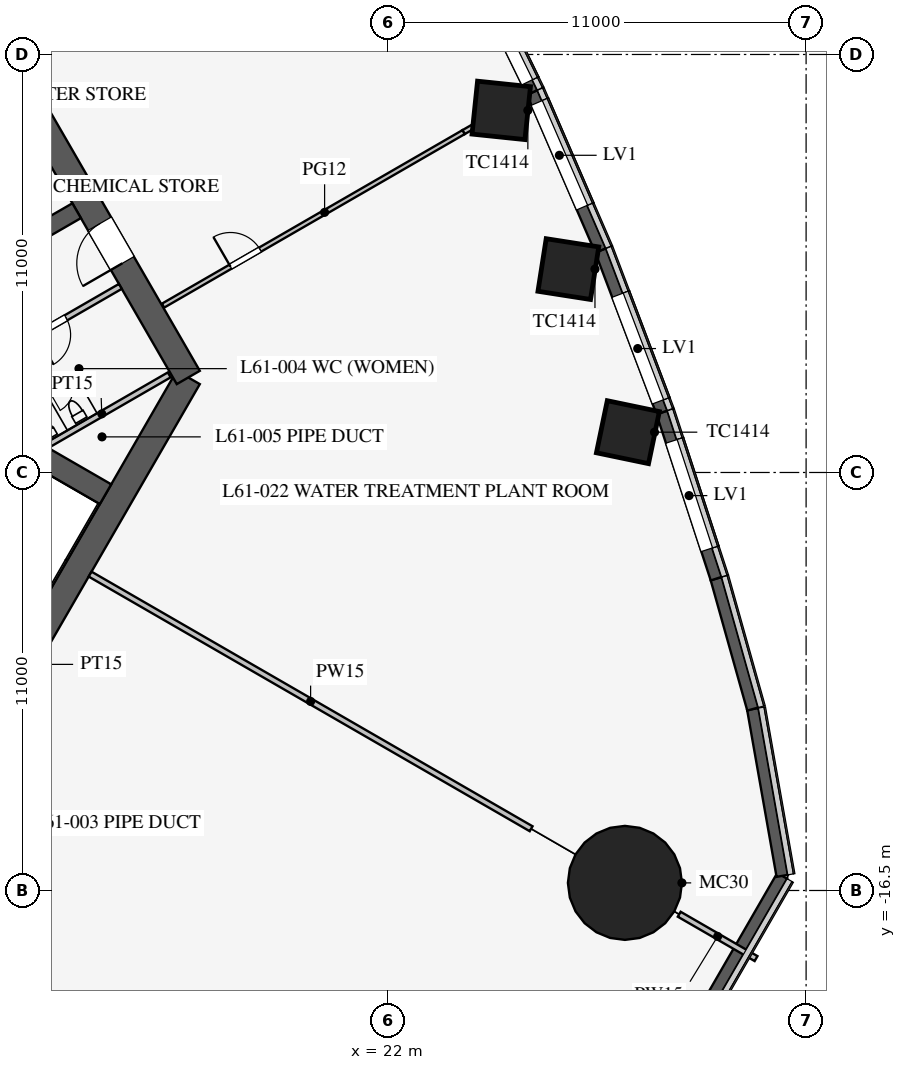
"""IFC4 building model, lengths in metres.
Left out: names, types, materials, properties, quantities, classifications, styles, units other than length and angle.
Written with IfcOpenShell. Run it as: python <this file> out.ifc"""

import sys

from ifc_helpers import new_model, si_unit, direction, frame, frame_2d, origin, origin_2d, place, context, subcontext, project, spatial, polyline, rectangle, circle, outline, extrude, clip, halfspace, element, fill, save


model = new_model("IFC4")
c1 = context("Model", 3, precision=1e-05, world=origin(), true_north=direction((0.0, 1.0)))
c2 = subcontext(c1, "Body", "Model", "MODEL_VIEW")
j1 = project(units=[si_unit("LENGTHUNIT", "METRE"), si_unit("PLANEANGLEUNIT", "RADIAN")], contexts=[c1])
p1 = place(None, origin())
s1 = spatial("IfcSite", under=j1, at=p1, CompositionType="ELEMENT")
p2 = place(p1, origin())
s2 = spatial("IfcBuilding", under=s1, at=p2, CompositionType="ELEMENT")
p3 = place(p2, frame((0.0, 0.0, 265.3)))
s3 = spatial("IfcBuildingStorey", under=s2, at=p3, CompositionType="ELEMENT", Elevation=265.3)
p4 = place(p3, frame((28.632, -4.254, 0.0), z_axis=(-0.255546793754, -0.147542991373, 0.955472083265), x_axis=(-0.320581329676, 0.945304069978, 0.060231439844)))
e1 = element("IfcColumn", 1, at=p4, inside=s3, PredefinedType="COLUMN", context=c2, shape_type="Clipping", body=[
    clip(clip(extrude(rectangle(XDim=1.4, YDim=1.4, at=origin_2d()), origin(), (0.0, 0.0, 1.0), 6.28), halfspace(frame((0.0, 0.0, 0.257), z_axis=(7.594889496753688e-06, -2.3779827352743425e-05, 0.9999999996884188), x_axis=(0.0, 0.99999999971726, 2.3779827353429264e-05)), True)), halfspace(frame((0.0, 0.0, 6.023), z_axis=(-7.594889496753688e-06, 2.3779827352743425e-05, -0.9999999996884188), x_axis=(0.0, -0.99999999971726, -2.3779827353429264e-05)), True)),
])
p5 = place(p3, frame((27.022, 0.013, 0.0), z_axis=(-0.223891049085, -0.129279785892, 0.96600182976), x_axis=(-0.364788927644, 0.930232982642, 0.03994541618)))
e2 = element("IfcColumn", 2, at=p5, inside=s3, PredefinedType="COLUMN", context=c2, shape_type="Clipping", body=[
    clip(clip(extrude(rectangle(XDim=1.4, YDim=1.4, at=origin_2d()), origin(), (0.0, 0.0, 1.0), 6.211), halfspace(frame((0.0, 0.0, 0.215), z_axis=(1.7703553432418806e-05, -2.2252505130410105e-05, 0.9999999995957052), x_axis=(0.0, 0.999999999752413, 2.2252505133897248e-05)), True)), halfspace(frame((0.0, 0.0, 5.996), z_axis=(-1.7703553432418806e-05, 2.2252505130410105e-05, -0.9999999995957052), x_axis=(0.0, -0.999999999752413, -2.2252505133897248e-05)), True)),
])
p6 = place(p3, frame((25.227, 4.172, 0.0), z_axis=(-0.201282046639, -0.116233851942, 0.972612579275), x_axis=(-0.410094064626, 0.911725070406, 0.024088465132)))
e3 = element("IfcColumn", 3, at=p6, inside=s3, PredefinedType="COLUMN", context=c2, shape_type="Clipping", body=[
    clip(clip(extrude(rectangle(XDim=1.4, YDim=1.4, at=origin_2d()), origin(), (0.0, 0.0, 1.0), 6.169), halfspace(frame((0.0, 0.0, 0.185), z_axis=(2.1284951141970626e-05, -6.9994991401256534e-06, 0.999999999748979), x_axis=(0.0, 0.9999999999755035, 6.999499141711211e-06)), True)), halfspace(frame((0.0, 0.0, 5.984), z_axis=(-2.1284951141970626e-05, 6.9994991401256534e-06, -0.999999999748979), x_axis=(0.0, -0.9999999999755035, -6.999499141711211e-06)), True)),
])
p7 = place(p3, frame((28.579, -16.5, 0.0), z_axis=(-0.273879842323, 0.158113013975, 0.948678083852), x_axis=(-0.499972520799, -0.866041268327, 0.0)))
e4 = element("IfcColumn", 4, at=p7, inside=s3, PredefinedType="COLUMN", context=c2, shape_type="Clipping", body=[
    clip(clip(extrude(circle(Radius=1.5, at=origin_2d()), origin(), (0.0, 0.0, 1.0), 6.325), halfspace(frame((0.0, 0.0, 0.501), z_axis=(-1.0033762616878938e-05, 1.6488271940395816e-05, 0.9999999998137303), x_axis=(0.0, 0.9999999998640685, -1.6488271941225806e-05)), True)), halfspace(frame((0.0, 0.0, 5.823), z_axis=(1.0033762616878938e-05, -1.6488271940395816e-05, -0.9999999998137303), x_axis=(0.0, -0.9999999998640685, 1.6488271941225806e-05)), True)),
])
p8 = place(p3, frame((10.97, -13.0, 0.0), z_axis=(0.0, 0.0, 1.0), x_axis=(0.499995765644, 0.866027848477, 0.0)))
e5 = element("IfcWall", 5, at=p8, inside=s3, PredefinedType="SHEAR", context=c2, shape_type="SweptSolid", body=[
    extrude(rectangle(XDim=11.547, YDim=0.7, at=frame_2d((5.773, 0.0))), origin(), (0.0, 0.0, 1.0), 6.0),
])
p9 = place(p3, frame((16.743, -3.0, 0.0), z_axis=(0.0, 0.0, 1.0), x_axis=(-0.500002442456, 0.866023993627, 0.0)))
e6 = element("IfcWall", 6, at=p9, inside=s3, PredefinedType="SHEAR", context=c2, shape_type="SweptSolid", body=[
    extrude(rectangle(XDim=21.939, YDim=0.7, at=frame_2d((10.97, 0.0))), origin(), (0.0, 0.0, 1.0), 6.0),
])
p10 = place(p9, frame((17.27, 0.0, 0.0)))
e7 = element("IfcOpeningElement", 7, at=p10, cuts=e6, PredefinedType="OPENING", context=c2, shape_type="SweptSolid", body=[
    extrude(rectangle(XDim=1.2, YDim=2.1, at=frame_2d((0.6, 1.05))), frame((0.0, 0.36, 0.0), z_axis=(0.0, -1.0, 0.0), x_axis=(1.0, 0.0, 0.0)), (0.0, 0.0, 1.0), 0.72),
])
p11 = place(p9, frame((3.47, 0.0, 0.0)))
e8 = element("IfcOpeningElement", 8, at=p11, cuts=e6, PredefinedType="OPENING", context=c2, shape_type="SweptSolid", body=[
    extrude(rectangle(XDim=1.2, YDim=2.1, at=frame_2d((0.6, 1.05))), frame((0.0, 0.36, 0.0), z_axis=(0.0, -1.0, 0.0), x_axis=(1.0, 0.0, 0.0)), (0.0, 0.0, 1.0), 0.72),
])
p12 = place(p3, frame((11.532, 0.076, 0.0), z_axis=(0.0, 0.0, 1.0), x_axis=(0.866013657776, 0.500020344131, 0.0)))
e9 = element("IfcWall", 9, at=p12, inside=s3, PredefinedType="SHEAR", context=c2, shape_type="SweptSolid", body=[
    extrude(rectangle(XDim=2.625, YDim=0.45, at=frame_2d((1.312, 0.0))), origin(), (0.0, 0.0, 1.0), 6.0),
])
p13 = place(p3, frame((6.663, -1.509, 0.0), z_axis=(0.0, 0.0, 1.0), x_axis=(0.866028310072, -0.499994966129, 0.0)))
e10 = element("IfcWall", 10, at=p13, inside=s3, PredefinedType="SHEAR", context=c2, shape_type="SweptSolid", body=[
    extrude(rectangle(XDim=9.125, YDim=0.6, at=frame_2d((4.562, 0.0))), origin(), (0.0, 0.0, 1.0), 6.0),
])
p14 = place(p3, frame((30.142, -19.976, 0.0), z_axis=(0.0, 0.0, 1.0), x_axis=(0.499973719246, 0.866040576453, 0.0)))
e11 = element("IfcWall", 11, at=p14, inside=s3, PredefinedType="SOLIDWALL", context=c2, shape_type="SweptSolid", body=[
    extrude(rectangle(XDim=4.458, YDim=0.3, at=frame_2d((2.229, 0.0))), origin(), (0.0, 0.0, 1.0), 5.8),
])
p15 = place(p3, frame((32.371, -16.115, 0.0), z_axis=(0.0, 0.0, 1.0), x_axis=(-0.173619736019, 0.984812767619, 0.0)))
e12 = element("IfcWall", 12, at=p15, inside=s3, PredefinedType="SOLIDWALL", context=c2, shape_type="SweptSolid", body=[
    extrude(rectangle(XDim=4.458, YDim=0.3, at=frame_2d((2.229, 0.0))), origin(), (0.0, 0.0, 1.0), 5.8),
])
p16 = place(p3, frame((31.597, -11.726, 0.0), z_axis=(0.0, 0.0, 1.0), x_axis=(-0.270338835198, 0.962765243548, 0.0)))
e13 = element("IfcWall", 13, at=p16, inside=s3, PredefinedType="SOLIDWALL", context=c2, shape_type="SweptSolid", body=[
    extrude(rectangle(XDim=3.563, YDim=0.3, at=frame_2d((1.782, 0.0))), origin(), (0.0, 0.0, 1.0), 5.8),
])
p17 = place(p3, frame((30.633, -8.295, 0.0), z_axis=(0.0, 0.0, 1.0), x_axis=(-0.310154105003, 0.950686294815, 0.0)))
e14 = element("IfcWall", 14, at=p17, inside=s3, PredefinedType="SOLIDWALL", context=c2, shape_type="SweptSolid", body=[
    extrude(rectangle(XDim=4.599, YDim=0.3, at=frame_2d((2.3, 0.0))), origin(), (0.0, 0.0, 1.0), 5.8),
])
p18 = place(p17, frame((0.8, 0.0, 3.5)))
e15 = element("IfcOpeningElement", 15, at=p18, cuts=e14, PredefinedType="OPENING", context=c2, shape_type="SweptSolid", body=[
    extrude(rectangle(XDim=3.0, YDim=2.0, at=frame_2d((1.5, 1.0))), frame((0.0, 0.16, 0.0), z_axis=(0.0, -1.0, 0.0), x_axis=(1.0, 0.0, 0.0)), (0.0, 0.0, 1.0), 0.32),
])
p19 = place(p3, frame((29.207, -3.922, 0.0), z_axis=(0.0, 0.0, 1.0), x_axis=(-0.354202230189, 0.935168851133, 0.0)))
e16 = element("IfcWall", 16, at=p19, inside=s3, PredefinedType="SOLIDWALL", context=c2, shape_type="SweptSolid", body=[
    extrude(rectangle(XDim=4.56, YDim=0.3, at=frame_2d((2.28, 0.0))), origin(), (0.0, 0.0, 1.0), 5.8),
])
p20 = place(p19, frame((0.3, 0.0, 3.5)))
e17 = element("IfcOpeningElement", 17, at=p20, cuts=e16, PredefinedType="OPENING", context=c2, shape_type="SweptSolid", body=[
    extrude(rectangle(XDim=3.0, YDim=2.0, at=frame_2d((1.5, 1.0))), frame((0.0, 0.16, 0.0), z_axis=(0.0, -1.0, 0.0), x_axis=(1.0, 0.0, 0.0)), (0.0, 0.0, 1.0), 0.32),
])
p21 = place(p3, frame((27.592, 0.342, 0.0), z_axis=(0.0, 0.0, 1.0), x_axis=(-0.397208101111, 0.917728567939, 0.0)))
e18 = element("IfcWall", 18, at=p21, inside=s3, PredefinedType="SOLIDWALL", context=c2, shape_type="SweptSolid", body=[
    extrude(rectangle(XDim=4.53, YDim=0.3, at=frame_2d((2.265, 0.0))), origin(), (0.0, 0.0, 1.0), 5.8),
])
p22 = place(p21, frame((1.23, 0.0, 3.5)))
e19 = element("IfcOpeningElement", 19, at=p22, cuts=e18, PredefinedType="OPENING", context=c2, shape_type="SweptSolid", body=[
    extrude(rectangle(XDim=3.0, YDim=2.0, at=frame_2d((1.5, 1.0))), frame((0.0, 0.16, 0.0), z_axis=(0.0, -1.0, 0.0), x_axis=(1.0, 0.0, 0.0)), (0.0, 0.0, 1.0), 0.32),
])
p23 = place(p3, frame((25.792, 4.499, 0.0), z_axis=(0.0, 0.0, 1.0), x_axis=(-0.439163535873, 0.898407139753, 0.0)))
e20 = element("IfcWall", 20, at=p23, inside=s3, PredefinedType="SOLIDWALL", context=c2, shape_type="SweptSolid", body=[
    extrude(rectangle(XDim=4.511, YDim=0.3, at=frame_2d((2.255, 0.0))), origin(), (0.0, 0.0, 1.0), 5.8),
])
p24 = place(p23, frame((0.3, 0.0, 3.5)))
e21 = element("IfcOpeningElement", 21, at=p24, cuts=e20, PredefinedType="OPENING", context=c2, shape_type="SweptSolid", body=[
    extrude(rectangle(XDim=3.0, YDim=2.0, at=frame_2d((1.5, 1.0))), frame((0.0, 0.16, 0.0), z_axis=(0.0, -1.0, 0.0), x_axis=(1.0, 0.0, 0.0)), (0.0, 0.0, 1.0), 0.32),
])
p25 = place(p3, frame((10.495, -3.178, 0.0), z_axis=(0.0, 0.0, 1.0), x_axis=(0.866037967349, 0.499978238636, 0.0)))
e22 = element("IfcWall", 22, at=p25, inside=s3, PredefinedType="PARTITIONING", context=c2, shape_type="SweptSolid", body=[
    extrude(rectangle(XDim=5.15, YDim=0.15, at=frame_2d((2.575, 0.0))), origin(), (0.0, 0.0, 1.0), 5.8),
])
p26 = place(p25, frame((2.6, 0.0, 0.0)))
e23 = element("IfcOpeningElement", 23, at=p26, cuts=e22, PredefinedType="OPENING", context=c2, shape_type="SweptSolid", body=[
    extrude(rectangle(XDim=0.9, YDim=2.1, at=frame_2d((0.45, 1.05))), frame((0.0, 0.085, 0.0), z_axis=(0.0, -1.0, 0.0), x_axis=(1.0, 0.0, 0.0)), (0.0, 0.0, 1.0), 0.17),
])
p27 = place(p3, frame((12.691, -4.982, 0.0), z_axis=(0.0, 0.0, 1.0), x_axis=(0.8660249478, 0.500000789788, 0.0)))
e24 = element("IfcWall", 24, at=p27, inside=s3, PredefinedType="PARTITIONING", context=c2, shape_type="SweptSolid", body=[
    extrude(rectangle(XDim=4.1, YDim=0.15, at=frame_2d((2.05, 0.0))), origin(), (0.0, 0.0, 1.0), 5.8),
])
p28 = place(p3, frame((14.159, -8.175, 0.0), z_axis=(0.0, 0.0, 1.0), x_axis=(0.866026905467, -0.499997399001, 0.0)))
e25 = element("IfcWall", 25, at=p28, inside=s3, PredefinedType="PARTITIONING", context=c2, shape_type="SweptSolid", body=[
    extrude(rectangle(XDim=13.4, YDim=0.15, at=frame_2d((6.7, 0.0))), origin(), (0.0, 0.0, 1.0), 4.3),
])
p29 = place(p3, frame((29.661, -17.125, 0.0), z_axis=(0.0, 0.0, 1.0), x_axis=(0.866027105532, -0.499997052475, 0.0)))
e26 = element("IfcWall", 26, at=p29, inside=s3, PredefinedType="PARTITIONING", context=c2, shape_type="SweptSolid", body=[
    extrude(rectangle(XDim=2.334, YDim=0.15, at=frame_2d((1.167, 0.0))), origin(), (0.0, 0.0, 1.0), 5.8),
])
p30 = place(p3, frame((23.986, 3.456, 0.0), z_axis=(0.0, 0.0, 1.0), x_axis=(0.866138304741, 0.499804398801, 0.0)))
e27 = element("IfcWall", 27, at=p30, inside=s3, PredefinedType="PARTITIONING", context=c2, shape_type="SweptSolid", body=[
    extrude(outline(polyline([(0.0, 0.0), (0.688, 0.0), (0.688, 0.05), (0.0, 2.9), (0.0, 0.0)])), frame((0.0, 0.06, 0.0), z_axis=(0.0, -1.0, 0.0), x_axis=(1.0, 0.0, 0.0)), (0.0, 0.0, 1.0), 0.12),
])
p31 = place(p3, frame((16.079, -1.109, 0.0), z_axis=(0.0, 0.0, 1.0), x_axis=(0.866026165896, 0.499998679983, 0.0)))
e28 = element("IfcWall", 28, at=p31, inside=s3, PredefinedType="PARTITIONING", context=c2, shape_type="SweptSolid", body=[
    extrude(rectangle(XDim=9.13, YDim=0.12, at=frame_2d((4.565, 0.0))), origin(), (0.0, 0.0, 1.0), 2.9),
])
p32 = place(p31, frame((2.05, 0.0, 0.0)))
e29 = element("IfcOpeningElement", 29, at=p32, cuts=e28, PredefinedType="OPENING", context=c2, shape_type="SweptSolid", body=[
    extrude(rectangle(XDim=0.9, YDim=2.1, at=frame_2d((0.45, 1.05))), frame((0.0, 0.07, 0.0), z_axis=(0.0, -1.0, 0.0), x_axis=(1.0, 0.0, 0.0)), (0.0, 0.0, 1.0), 0.14),
])
p33 = place(p18, origin())
e30 = element("IfcWindow", 30, at=p33, inside=s3, PartitioningType="SINGLE_PANEL", PredefinedType="USERDEFINED", context=c2, shape_type="SweptSolid", body=[
    extrude(rectangle(XDim=3.0, YDim=2.0, at=frame_2d((1.5, 1.0))), frame((0.0, 0.03, 0.0), z_axis=(0.0, -1.0, 0.0), x_axis=(1.0, 0.0, 0.0)), (0.0, 0.0, 1.0), 0.06),
])
fill(e15, e30)
p34 = place(p20, origin())
e31 = element("IfcWindow", 31, at=p34, inside=s3, PartitioningType="SINGLE_PANEL", PredefinedType="USERDEFINED", context=c2, shape_type="SweptSolid", body=[
    extrude(rectangle(XDim=3.0, YDim=2.0, at=frame_2d((1.5, 1.0))), frame((0.0, 0.03, 0.0), z_axis=(0.0, -1.0, 0.0), x_axis=(1.0, 0.0, 0.0)), (0.0, 0.0, 1.0), 0.06),
])
fill(e17, e31)
p35 = place(p22, origin())
e32 = element("IfcWindow", 32, at=p35, inside=s3, PartitioningType="SINGLE_PANEL", PredefinedType="USERDEFINED", context=c2, shape_type="SweptSolid", body=[
    extrude(rectangle(XDim=3.0, YDim=2.0, at=frame_2d((1.5, 1.0))), frame((0.0, 0.03, 0.0), z_axis=(0.0, -1.0, 0.0), x_axis=(1.0, 0.0, 0.0)), (0.0, 0.0, 1.0), 0.06),
])
fill(e19, e32)
p36 = place(p24, origin())
e33 = element("IfcWindow", 33, at=p36, inside=s3, PartitioningType="SINGLE_PANEL", PredefinedType="USERDEFINED", context=c2, shape_type="SweptSolid", body=[
    extrude(rectangle(XDim=3.0, YDim=2.0, at=frame_2d((1.5, 1.0))), frame((0.0, 0.03, 0.0), z_axis=(0.0, -1.0, 0.0), x_axis=(1.0, 0.0, 0.0)), (0.0, 0.0, 1.0), 0.06),
])
fill(e21, e33)
p37 = place(p26, frame((0.9, 0.0, 0.0), z_axis=(0.0, 0.0, 1.0), x_axis=(-1.0, 0.0, 0.0)))
e34 = element("IfcDoor", 34, at=p37, inside=s3, OperationType="SINGLE_SWING_RIGHT", PredefinedType="DOOR", context=c2, shape_type="SweptSolid", body=[
    extrude(rectangle(XDim=0.9, YDim=2.1, at=frame_2d((0.45, 1.05))), frame((0.0, 0.025, 0.0), z_axis=(0.0, -1.0, 0.0), x_axis=(1.0, 0.0, 0.0)), (0.0, 0.0, 1.0), 0.05),
])
fill(e23, e34)
p38 = place(p11, origin())
e35 = element("IfcDoor", 35, at=p38, inside=s3, OperationType="SINGLE_SWING_LEFT", PredefinedType="DOOR", context=c2, shape_type="SweptSolid", body=[
    extrude(rectangle(XDim=1.2, YDim=2.1, at=frame_2d((0.6, 1.05))), frame((0.0, 0.025, 0.0), z_axis=(0.0, -1.0, 0.0), x_axis=(1.0, 0.0, 0.0)), (0.0, 0.0, 1.0), 0.05),
])
fill(e8, e35)
p39 = place(p32, origin())
e36 = element("IfcDoor", 36, at=p39, inside=s3, OperationType="SINGLE_SWING_LEFT", PredefinedType="DOOR", context=c2, shape_type="SweptSolid", body=[
    extrude(rectangle(XDim=0.9, YDim=2.1, at=frame_2d((0.45, 1.05))), frame((0.0, 0.025, 0.0), z_axis=(0.0, -1.0, 0.0), x_axis=(1.0, 0.0, 0.0)), (0.0, 0.0, 1.0), 0.05),
])
fill(e29, e36)
save(model, sys.argv[1])
